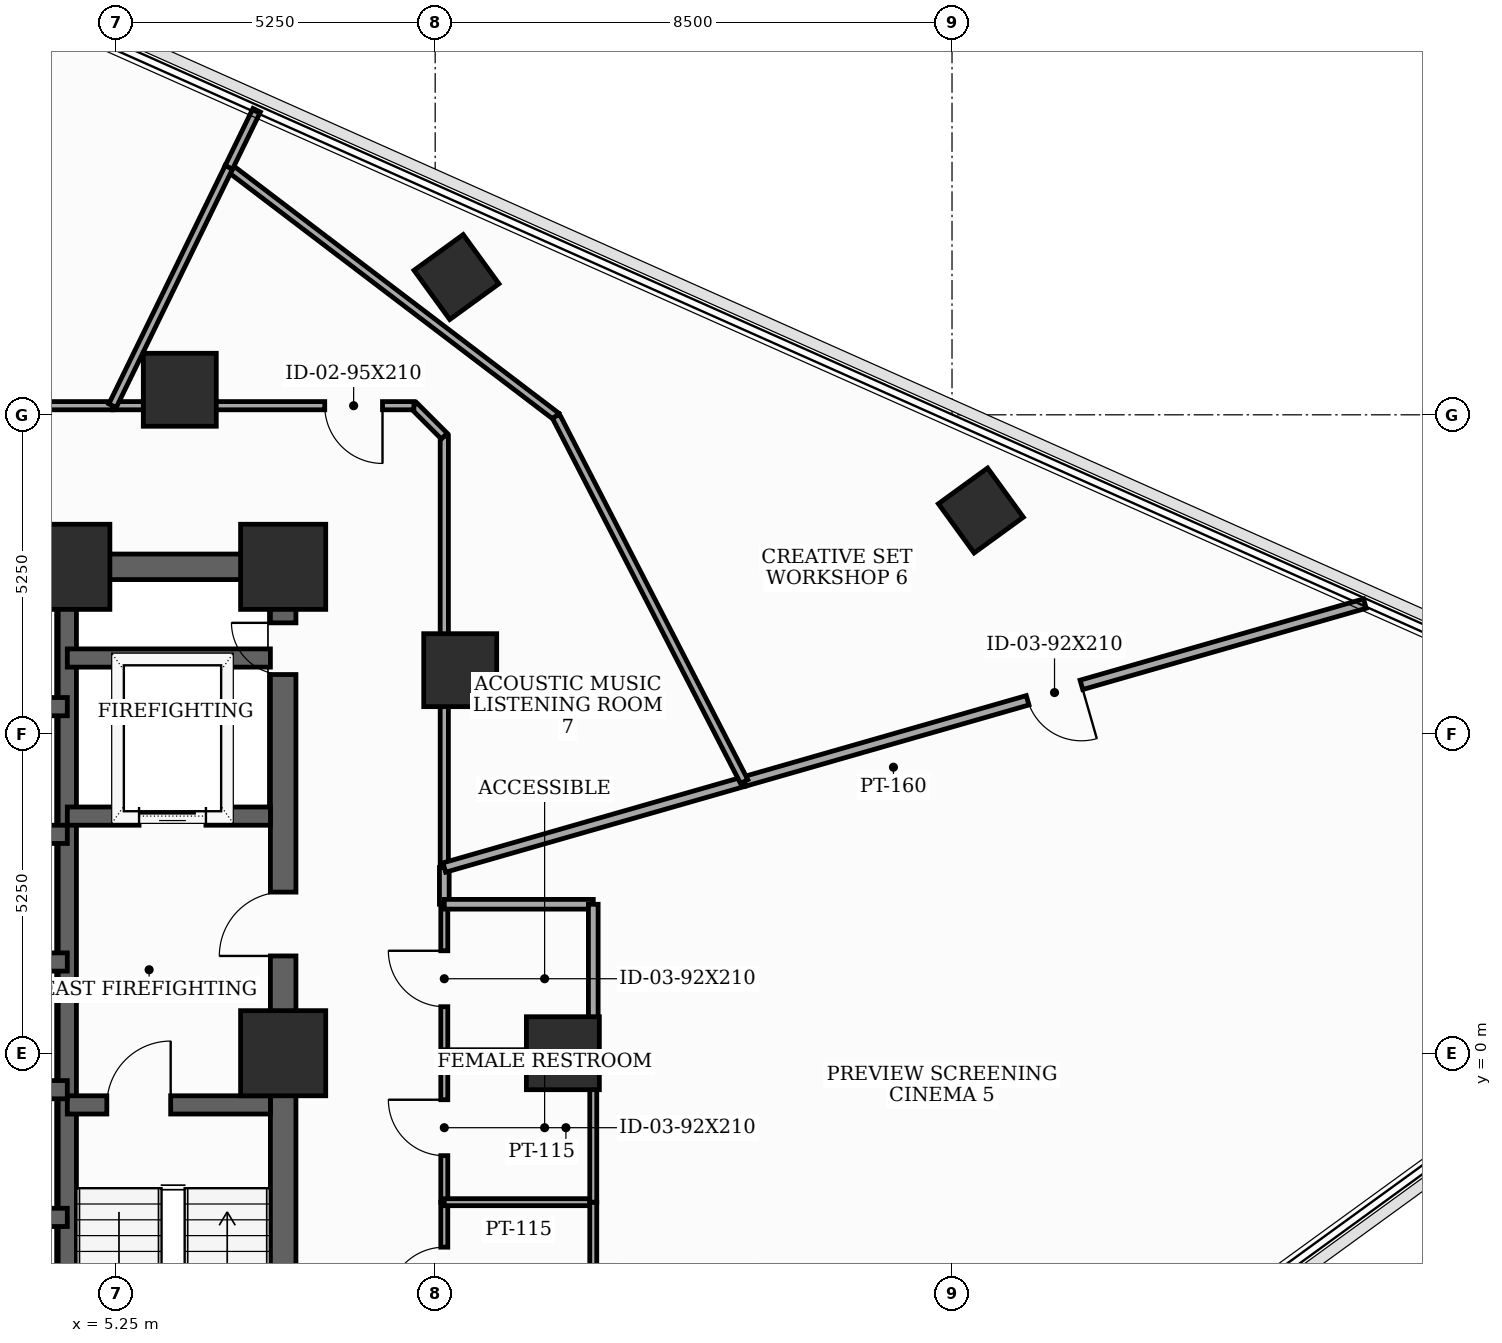
"""IFC4 building model, lengths in metres.
Left out: names, types, materials, properties, quantities, classifications, styles, units other than length and angle.
Written with IfcOpenShell. Run it as: python <this file> out.ifc"""

import sys

from ifc_helpers import new_model, si_unit, direction, frame, frame_2d, origin, origin_2d, place, context, subcontext, project, spatial, rectangle, extrude, element, fill, save


model = new_model("IFC4")
c1 = context("Model", 3, precision=1e-05, world=origin(), true_north=direction((0.0, 1.0)))
c2 = subcontext(c1, "Body", "Model", "MODEL_VIEW")
j1 = project(units=[si_unit("LENGTHUNIT", "METRE"), si_unit("PLANEANGLEUNIT", "RADIAN")], contexts=[c1])
p1 = place(None, origin())
s1 = spatial("IfcSite", under=j1, at=p1, CompositionType="ELEMENT")
p2 = place(p1, origin())
s2 = spatial("IfcBuilding", under=s1, at=p2, CompositionType="ELEMENT")
p3 = place(p2, frame((0.0, 0.0, 158.3)))
s3 = spatial("IfcBuildingStorey", under=s2, at=p3, CompositionType="ELEMENT", Elevation=158.3)
for number, where, z_axis, x_axis in (
    (1, (8.0, 0.0, 0.0), (0.0, 0.0, 1.0), (1.0, 0.0, 0.0)),
    (2, (8.0, 8.0, 0.0), (0.0, 0.0, 1.0), (1.0, 0.0, 0.0)),
    (3, (4.45, 8.0, 0.0), (0.0, 0.0, 1.0), (1.0, 0.0, 0.0)),
):
    element("IfcColumn", number, at=place(p3, frame(where, z_axis=z_axis, x_axis=x_axis)), inside=s3, PredefinedType="COLUMN", context=c2, shape_type="SweptSolid", body=[
        extrude(rectangle(XDim=1.4, YDim=1.4, at=origin_2d()), origin(), (0.0, 0.0, 1.0), 3.7),
    ])
for number, where, z_axis, x_axis in (
    (4, (12.6, 0.0, 0.0), (0.0, 0.0, 1.0), (1.0, 0.0, 0.0)),
    (5, (10.912, 6.3, 0.0), (0.0, 0.0, 1.0), (1.0, 0.0, 0.0)),
    (6, (6.3, 10.912, 0.0), (0.0, 0.0, 1.0), (1.0, 0.0, 0.0)),
):
    element("IfcColumn", number, at=place(p3, frame(where, z_axis=z_axis, x_axis=x_axis)), inside=s3, PredefinedType="COLUMN", context=c2, shape_type="SweptSolid", body=[
        extrude(rectangle(XDim=1.2, YDim=1.2, at=origin_2d()), origin(), (0.0, 0.0, 1.0), 3.7),
    ])
for number, where, z_axis, x_axis in (
    (7, (19.474, 8.926, 0.0), (0.0, 0.0, 1.0), (0.809, 0.588, 0.0)),
    (8, (10.85, 12.766, 0.0), (0.0, 0.0, 1.0), (0.809, 0.588, 0.0)),
):
    element("IfcColumn", number, at=place(p3, frame(where, z_axis=z_axis, x_axis=x_axis)), inside=s3, PredefinedType="COLUMN", context=c2, shape_type="SweptSolid", body=[
        extrude(rectangle(XDim=1.0, YDim=1.0, at=origin_2d()), origin(), (0.0, 0.0, 1.0), 3.7),
    ])
p4 = place(p3, frame((8.0, -8.0, 0.0), z_axis=(0.0, 0.0, 1.0), x_axis=(0.0, 1.0, 0.0)))
e9 = element("IfcWall", 9, at=p4, inside=s3, PredefinedType="SHEAR", context=c2, shape_type="SweptSolid", body=[
    extrude(rectangle(XDim=16.0, YDim=0.42, at=frame_2d((8.0, 0.0))), origin(), (0.0, 0.0, 1.0), 3.5),
])
p5 = place(p4, frame((9.6, 0.0, 0.0)))
e10 = element("IfcOpeningElement", 10, at=p5, cuts=e9, PredefinedType="OPENING", context=c2, shape_type="SweptSolid", body=[
    extrude(rectangle(XDim=1.05, YDim=2.15, at=frame_2d((0.525, 1.075))), frame((0.0, 0.22, 0.0), z_axis=(0.0, -1.0, 0.0), x_axis=(1.0, 0.0, 0.0)), (0.0, 0.0, 1.0), 0.44),
])
p6 = place(p4, frame((14.229, 0.0, 0.0)))
e11 = element("IfcOpeningElement", 11, at=p6, cuts=e9, PredefinedType="OPENING", context=c2, shape_type="SweptSolid", body=[
    extrude(rectangle(XDim=0.85, YDim=2.02, at=frame_2d((0.425, 1.01))), frame((0.0, 0.22, 0.0), z_axis=(0.0, -1.0, 0.0), x_axis=(1.0, 0.0, 0.0)), (0.0, 0.0, 1.0), 0.44),
])
p7 = place(p3, frame((-8.0, 8.0, 0.0), z_axis=(0.0, 0.0, 1.0), x_axis=(1.0, 0.0, 0.0)))
e12 = element("IfcWall", 12, at=p7, inside=s3, PredefinedType="SHEAR", context=c2, shape_type="SweptSolid", body=[
    extrude(rectangle(XDim=16.0, YDim=0.42, at=frame_2d((8.0, 0.0))), origin(), (0.0, 0.0, 1.0), 3.5),
])
p8 = place(p7, frame((7.1, 0.0, 0.0)))
e13 = element("IfcOpeningElement", 13, at=p8, cuts=e12, PredefinedType="OPENING", context=c2, shape_type="SweptSolid", body=[
    extrude(rectangle(XDim=1.8, YDim=2.15, at=frame_2d((0.9, 1.075))), frame((0.0, 0.22, 0.0), z_axis=(0.0, -1.0, 0.0), x_axis=(1.0, 0.0, 0.0)), (0.0, 0.0, 1.0), 0.44),
])
p9 = place(p3, frame((4.45, -7.79, 0.0), z_axis=(0.0, 0.0, 1.0), x_axis=(0.0, 1.0, 0.0)))
e14 = element("IfcWall", 14, at=p9, inside=s3, PredefinedType="SHEAR", context=c2, shape_type="SweptSolid", body=[
    extrude(rectangle(XDim=15.58, YDim=0.3, at=frame_2d((7.79, 0.0))), origin(), (0.0, 0.0, 1.0), 3.5),
])
p10 = place(p3, frame((4.45, -0.85, 0.0), z_axis=(0.0, 0.0, 1.0), x_axis=(1.0, 0.0, 0.0)))
e15 = element("IfcWall", 15, at=p10, inside=s3, PredefinedType="SHEAR", context=c2, shape_type="SweptSolid", body=[
    extrude(rectangle(XDim=3.34, YDim=0.3, at=frame_2d((1.67, 0.0))), origin(), (0.0, 0.0, 1.0), 3.5),
])
p11 = place(p10, frame((0.65, 0.0, 0.0)))
e16 = element("IfcOpeningElement", 16, at=p11, cuts=e15, PredefinedType="OPENING", context=c2, shape_type="SweptSolid", body=[
    extrude(rectangle(XDim=1.05, YDim=2.15, at=frame_2d((0.525, 1.075))), frame((0.0, 0.16, 0.0), z_axis=(0.0, -1.0, 0.0), x_axis=(1.0, 0.0, 0.0)), (0.0, 0.0, 1.0), 0.32),
])
p12 = place(p3, frame((4.45, 3.9, 0.0), z_axis=(0.0, 0.0, 1.0), x_axis=(1.0, 0.0, 0.0)))
e17 = element("IfcWall", 17, at=p12, inside=s3, PredefinedType="SHEAR", context=c2, shape_type="SweptSolid", body=[
    extrude(rectangle(XDim=3.34, YDim=0.3, at=frame_2d((1.67, 0.0))), origin(), (0.0, 0.0, 1.0), 3.5),
])
p13 = place(p12, frame((1.18, 0.0, 0.0)))
e18 = element("IfcOpeningElement", 18, at=p13, cuts=e17, PredefinedType="OPENING", context=c2, shape_type="SweptSolid", body=[
    extrude(rectangle(XDim=1.1, YDim=2.1, at=frame_2d((0.55, 1.05))), frame((0.0, 0.16, 0.0), z_axis=(0.0, -1.0, 0.0), x_axis=(1.0, 0.0, 0.0)), (0.0, 0.0, 1.0), 0.32),
])
p14 = place(p3, frame((4.45, 6.5, 0.0), z_axis=(0.0, 0.0, 1.0), x_axis=(1.0, 0.0, 0.0)))
e19 = element("IfcWall", 19, at=p14, inside=s3, PredefinedType="SHEAR", context=c2, shape_type="SweptSolid", body=[
    extrude(rectangle(XDim=3.34, YDim=0.3, at=frame_2d((1.67, 0.0))), origin(), (0.0, 0.0, 1.0), 3.5),
])
for number, where, z_axis, x_axis in (
    (20, (1.68, 1.5, 0.0), (0.0, 0.0, 1.0), (1.0, 0.0, 0.0)),
    (21, (1.68, 3.6, 0.0), (0.0, 0.0, 1.0), (1.0, 0.0, 0.0)),
    (22, (1.68, 5.7, 0.0), (0.0, 0.0, 1.0), (1.0, 0.0, 0.0)),
    (23, (1.68, -2.7, 0.0), (0.0, 0.0, 1.0), (1.0, 0.0, 0.0)),
    (24, (1.68, -0.6, 0.0), (0.0, 0.0, 1.0), (1.0, 0.0, 0.0)),
):
    element("IfcWall", number, at=place(p3, frame(where, z_axis=z_axis, x_axis=x_axis)), inside=s3, PredefinedType="SHEAR", context=c2, shape_type="SweptSolid", body=[
        extrude(rectangle(XDim=2.77, YDim=0.3, at=frame_2d((1.385, 0.0))), origin(), (0.0, 0.0, 1.0), 3.5),
    ])
p15 = place(p3, frame((10.65, -4.85, 0.0), z_axis=(0.0, 0.0, 1.0), x_axis=(0.0, 1.0, 0.0)))
e25 = element("IfcWall", 25, at=p15, inside=s3, PredefinedType="PARTITIONING", context=c2, shape_type="SweptSolid", body=[
    extrude(rectangle(XDim=2.4, YDim=0.115, at=frame_2d((1.2, 0.0))), origin(), (0.0, 0.0, 1.0), 3.5),
])
p16 = place(p15, frame((0.74, 0.0, 0.0)))
e26 = element("IfcOpeningElement", 26, at=p16, cuts=e25, PredefinedType="OPENING", context=c2, shape_type="SweptSolid", body=[
    extrude(rectangle(XDim=0.92, YDim=2.1, at=frame_2d((0.46, 1.05))), frame((0.0, 0.067, 0.0), z_axis=(0.0, -1.0, 0.0), x_axis=(1.0, 0.0, 0.0)), (0.0, 0.0, 1.0), 0.135),
])
p17 = place(p3, frame((10.65, -2.45, 0.0), z_axis=(0.0, 0.0, 1.0), x_axis=(0.0, 1.0, 0.0)))
e27 = element("IfcWall", 27, at=p17, inside=s3, PredefinedType="PARTITIONING", context=c2, shape_type="SweptSolid", body=[
    extrude(rectangle(XDim=2.45, YDim=0.115, at=frame_2d((1.225, 0.0))), origin(), (0.0, 0.0, 1.0), 2.885),
])
p18 = place(p17, frame((0.765, 0.0, 0.0)))
e28 = element("IfcOpeningElement", 28, at=p18, cuts=e27, PredefinedType="OPENING", context=c2, shape_type="SweptSolid", body=[
    extrude(rectangle(XDim=0.92, YDim=2.1, at=frame_2d((0.46, 1.05))), frame((0.0, 0.067, 0.0), z_axis=(0.0, -1.0, 0.0), x_axis=(1.0, 0.0, 0.0)), (0.0, 0.0, 1.0), 0.135),
])
p19 = place(p3, frame((10.65, 2.45, 0.0), z_axis=(0.0, 0.0, 1.0), x_axis=(0.0, 1.0, 0.0)))
e29 = element("IfcWall", 29, at=p19, inside=s3, PredefinedType="PARTITIONING", context=c2, shape_type="SweptSolid", body=[
    extrude(rectangle(XDim=0.604, YDim=0.16, at=frame_2d((0.302, 0.0))), origin(), (0.0, 0.0, 1.0), 3.5),
])
p20 = place(p3, frame((10.65, 0.0, 0.0), z_axis=(0.0, 0.0, 1.0), x_axis=(0.0, 1.0, 0.0)))
e30 = element("IfcWall", 30, at=p20, inside=s3, PredefinedType="PARTITIONING", context=c2, shape_type="SweptSolid", body=[
    extrude(rectangle(XDim=2.45, YDim=0.115, at=frame_2d((1.225, 0.0))), origin(), (0.0, 0.0, 1.0), 2.885),
])
p21 = place(p20, frame((0.765, 0.0, 0.0)))
e31 = element("IfcOpeningElement", 31, at=p21, cuts=e30, PredefinedType="OPENING", context=c2, shape_type="SweptSolid", body=[
    extrude(rectangle(XDim=0.92, YDim=2.1, at=frame_2d((0.46, 1.05))), frame((0.0, 0.067, 0.0), z_axis=(0.0, -1.0, 0.0), x_axis=(1.0, 0.0, 0.0)), (0.0, 0.0, 1.0), 0.135),
])
p22 = place(p3, frame((10.65, 3.054, 0.0), z_axis=(0.0, 0.0, 1.0), x_axis=(0.0, 1.0, 0.0)))
e32 = element("IfcWall", 32, at=p22, inside=s3, PredefinedType="PARTITIONING", context=c2, shape_type="SweptSolid", body=[
    extrude(rectangle(XDim=7.096, YDim=0.135, at=frame_2d((3.548, 0.0))), origin(), (0.0, 0.0, 1.0), 2.885),
])
p23 = place(p3, frame((10.65, 10.15, 0.0), z_axis=(0.0, 0.0, 1.0), x_axis=(-0.707106781187, 0.707106781187, 0.0)))
e33 = element("IfcWall", 33, at=p23, inside=s3, PredefinedType="PARTITIONING", context=c2, shape_type="SweptSolid", body=[
    extrude(rectangle(XDim=0.707, YDim=0.135, at=frame_2d((0.354, 0.0))), origin(), (0.0, 0.0, 1.0), 3.5),
])
p24 = place(p3, frame((10.15, 10.65, 0.0), z_axis=(0.0, 0.0, 1.0), x_axis=(-1.0, 0.0, 0.0)))
e34 = element("IfcWall", 34, at=p24, inside=s3, PredefinedType="PARTITIONING", context=c2, shape_type="SweptSolid", body=[
    extrude(rectangle(XDim=4.956, YDim=0.135, at=frame_2d((2.478, 0.0))), origin(), (0.0, 0.0, 1.0), 2.885),
])
p25 = place(p24, frame((0.516, 0.0, 0.0)))
e35 = element("IfcOpeningElement", 35, at=p25, cuts=e34, PredefinedType="OPENING", context=c2, shape_type="SweptSolid", body=[
    extrude(rectangle(XDim=0.95, YDim=2.1, at=frame_2d((0.475, 1.05))), frame((0.0, 0.077, 0.0), z_axis=(0.0, -1.0, 0.0), x_axis=(1.0, 0.0, 0.0)), (0.0, 0.0, 1.0), 0.155),
])
p26 = place(p3, frame((5.194, 10.65, 0.0), z_axis=(0.0, 0.0, 1.0), x_axis=(-1.0, 0.0, 0.0)))
e36 = element("IfcWall", 36, at=p26, inside=s3, PredefinedType="PARTITIONING", context=c2, shape_type="SweptSolid", body=[
    extrude(rectangle(XDim=11.343, YDim=0.135, at=frame_2d((5.671, 0.0))), origin(), (0.0, 0.0, 1.0), 2.885),
])
p27 = place(p26, frame((6.558, 0.0, 0.0)))
e37 = element("IfcOpeningElement", 37, at=p27, cuts=e36, PredefinedType="OPENING", context=c2, shape_type="SweptSolid", body=[
    extrude(rectangle(XDim=0.95, YDim=2.1, at=frame_2d((0.475, 1.05))), frame((0.0, 0.077, 0.0), z_axis=(0.0, -1.0, 0.0), x_axis=(1.0, 0.0, 0.0)), (0.0, 0.0, 1.0), 0.155),
])
p28 = place(p3, frame((13.1, -2.45, 0.0), z_axis=(0.0, 0.0, 1.0), x_axis=(-1.0, 0.0, 0.0)))
e38 = element("IfcWall", 38, at=p28, inside=s3, PredefinedType="PARTITIONING", context=c2, shape_type="SweptSolid", body=[
    extrude(rectangle(XDim=2.45, YDim=0.115, at=frame_2d((1.225, 0.0))), origin(), (0.0, 0.0, 1.0), 2.885),
])
p29 = place(p3, frame((13.1, -4.85, 0.0), z_axis=(0.0, 0.0, 1.0), x_axis=(0.0, 1.0, 0.0)))
e39 = element("IfcWall", 39, at=p29, inside=s3, PredefinedType="PARTITIONING", context=c2, shape_type="SweptSolid", body=[
    extrude(rectangle(XDim=2.4, YDim=0.115, at=frame_2d((1.2, 0.0))), origin(), (0.0, 0.0, 1.0), 3.5),
])
p30 = place(p3, frame((13.1, -2.45, 0.0), z_axis=(0.0, 0.0, 1.0), x_axis=(0.0, 1.0, 0.0)))
e40 = element("IfcWall", 40, at=p30, inside=s3, PredefinedType="PARTITIONING", context=c2, shape_type="SweptSolid", body=[
    extrude(rectangle(XDim=2.45, YDim=0.115, at=frame_2d((1.225, 0.0))), origin(), (0.0, 0.0, 1.0), 2.885),
])
p31 = place(p3, frame((13.1, 0.0, 0.0), z_axis=(0.0, 0.0, 1.0), x_axis=(-1.0, 0.0, 0.0)))
e41 = element("IfcWall", 41, at=p31, inside=s3, PredefinedType="PARTITIONING", context=c2, shape_type="SweptSolid", body=[
    extrude(rectangle(XDim=2.45, YDim=0.115, at=frame_2d((1.225, 0.0))), origin(), (0.0, 0.0, 1.0), 2.885),
])
p32 = place(p3, frame((10.65, 2.45, 0.0), z_axis=(0.0, 0.0, 1.0), x_axis=(1.0, 0.0, 0.0)))
e42 = element("IfcWall", 42, at=p32, inside=s3, PredefinedType="PARTITIONING", context=c2, shape_type="SweptSolid", body=[
    extrude(rectangle(XDim=2.45, YDim=0.16, at=frame_2d((1.225, 0.0))), origin(), (0.0, 0.0, 1.0), 2.885),
])
p33 = place(p3, frame((13.1, 2.45, 0.0), z_axis=(0.0, 0.0, 1.0), x_axis=(0.0, -1.0, 0.0)))
e43 = element("IfcWall", 43, at=p33, inside=s3, PredefinedType="PARTITIONING", context=c2, shape_type="SweptSolid", body=[
    extrude(rectangle(XDim=2.45, YDim=0.16, at=frame_2d((1.225, 0.0))), origin(), (0.0, 0.0, 1.0), 3.5),
])
p34 = place(p3, frame((25.79, 7.395, 0.0), z_axis=(0.0, 0.0, 1.0), x_axis=(-0.961256282332, -0.275656234607, 0.0)))
e44 = element("IfcWall", 44, at=p34, inside=s3, PredefinedType="PARTITIONING", context=c2, shape_type="SweptSolid", body=[
    extrude(rectangle(XDim=10.619, YDim=0.16, at=frame_2d((5.31, 0.0))), origin(), (0.0, 0.0, 1.0), 2.985),
])
p35 = place(p34, frame((4.85, 0.0, 0.0)))
e45 = element("IfcOpeningElement", 45, at=p35, cuts=e44, PredefinedType="OPENING", context=c2, shape_type="SweptSolid", body=[
    extrude(rectangle(XDim=0.92, YDim=2.1, at=frame_2d((0.46, 1.05))), frame((0.0, 0.09, 0.0), z_axis=(0.0, -1.0, 0.0), x_axis=(1.0, 0.0, 0.0)), (0.0, 0.0, 1.0), 0.18),
])
p36 = place(p3, frame((15.582, 4.468, 0.0), z_axis=(0.0, 0.0, 1.0), x_axis=(-0.961272163105, -0.275600849852, 0.0)))
e46 = element("IfcWall", 46, at=p36, inside=s3, PredefinedType="PARTITIONING", context=c2, shape_type="SweptSolid", body=[
    extrude(rectangle(XDim=5.131, YDim=0.16, at=frame_2d((2.565, 0.0))), origin(), (0.0, 0.0, 1.0), 2.885),
])
p37 = place(p3, frame((7.106, 14.569, 0.0), z_axis=(0.0, 0.0, 1.0), x_axis=(0.795990968219, -0.60530849863, 0.0)))
e47 = element("IfcWall", 47, at=p37, inside=s3, PredefinedType="PARTITIONING", context=c2, shape_type="SweptSolid", body=[
    extrude(rectangle(XDim=6.76, YDim=0.135, at=frame_2d((3.38, 0.0))), origin(), (0.0, 0.0, 1.0), 2.885),
])
p38 = place(p3, frame((12.487, 10.477, 0.0), z_axis=(0.0, 0.0, 1.0), x_axis=(0.457887389752, -0.889010201464, 0.0)))
e48 = element("IfcWall", 48, at=p38, inside=s3, PredefinedType="PARTITIONING", context=c2, shape_type="SweptSolid", body=[
    extrude(rectangle(XDim=6.759, YDim=0.135, at=frame_2d((3.38, 0.0))), origin(), (0.0, 0.0, 1.0), 2.885),
])
p39 = place(p3, frame((7.564, 15.51, 0.0), z_axis=(0.0, 0.0, 1.0), x_axis=(-0.438230528202, -0.898862616951, 0.0)))
e49 = element("IfcWall", 49, at=p39, inside=s3, PredefinedType="PARTITIONING", context=c2, shape_type="SweptSolid", body=[
    extrude(rectangle(XDim=1.046, YDim=0.135, at=frame_2d((0.523, 0.0))), origin(), (0.0, 0.0, 1.0), 2.985),
])
p40 = place(p3, frame((7.106, 14.569, 0.0), z_axis=(0.0, 0.0, 1.0), x_axis=(-0.43843576568, -0.898762526684, 0.0)))
e50 = element("IfcWall", 50, at=p40, inside=s3, PredefinedType="PARTITIONING", context=c2, shape_type="SweptSolid", body=[
    extrude(rectangle(XDim=4.361, YDim=0.135, at=frame_2d((2.18, 0.0))), origin(), (0.0, 0.0, 1.0), 2.885),
])
p41 = place(p5, origin())
e51 = element("IfcDoor", 51, at=p41, inside=s3, OperationType="SINGLE_SWING_LEFT", PredefinedType="DOOR", context=c2, shape_type="SweptSolid", body=[
    extrude(rectangle(XDim=1.05, YDim=2.15, at=frame_2d((0.525, 1.075))), frame((0.0, 0.025, 0.0), z_axis=(0.0, -1.0, 0.0), x_axis=(1.0, 0.0, 0.0)), (0.0, 0.0, 1.0), 0.05),
])
fill(e10, e51)
p42 = place(p6, origin())
e52 = element("IfcDoor", 52, at=p42, inside=s3, OperationType="SINGLE_SWING_RIGHT", PredefinedType="TRAPDOOR", context=c2, shape_type="SweptSolid", body=[
    extrude(rectangle(XDim=0.85, YDim=2.02, at=frame_2d((0.425, 1.01))), frame((0.0, 0.025, 0.0), z_axis=(0.0, -1.0, 0.0), x_axis=(1.0, 0.0, 0.0)), (0.0, 0.0, 1.0), 0.05),
])
fill(e11, e52)
p43 = place(p11, origin())
e53 = element("IfcDoor", 53, at=p43, inside=s3, OperationType="SINGLE_SWING_RIGHT", PredefinedType="DOOR", context=c2, shape_type="SweptSolid", body=[
    extrude(rectangle(XDim=1.05, YDim=2.15, at=frame_2d((0.525, 1.075))), frame((0.0, 0.025, 0.0), z_axis=(0.0, -1.0, 0.0), x_axis=(1.0, 0.0, 0.0)), (0.0, 0.0, 1.0), 0.05),
])
fill(e16, e53)
p44 = place(p13, origin())
e54 = element("IfcDoor", 54, at=p44, inside=s3, OperationType="SLIDING_TO_LEFT", PredefinedType="DOOR", context=c2, shape_type="SweptSolid", body=[
    extrude(rectangle(XDim=1.1, YDim=2.1, at=frame_2d((0.55, 1.05))), frame((0.0, 0.025, 0.0), z_axis=(0.0, -1.0, 0.0), x_axis=(1.0, 0.0, 0.0)), (0.0, 0.0, 1.0), 0.05),
])
fill(e18, e54)
p45 = place(p16, origin())
e55 = element("IfcDoor", 55, at=p45, inside=s3, OperationType="SINGLE_SWING_LEFT", PredefinedType="DOOR", context=c2, shape_type="SweptSolid", body=[
    extrude(rectangle(XDim=0.92, YDim=2.1, at=frame_2d((0.46, 1.05))), frame((0.0, 0.025, 0.0), z_axis=(0.0, -1.0, 0.0), x_axis=(1.0, 0.0, 0.0)), (0.0, 0.0, 1.0), 0.05),
])
fill(e26, e55)
p46 = place(p18, origin())
e56 = element("IfcDoor", 56, at=p46, inside=s3, OperationType="SINGLE_SWING_RIGHT", PredefinedType="DOOR", context=c2, shape_type="SweptSolid", body=[
    extrude(rectangle(XDim=0.92, YDim=2.1, at=frame_2d((0.46, 1.05))), frame((0.0, 0.025, 0.0), z_axis=(0.0, -1.0, 0.0), x_axis=(1.0, 0.0, 0.0)), (0.0, 0.0, 1.0), 0.05),
])
fill(e28, e56)
p47 = place(p21, origin())
e57 = element("IfcDoor", 57, at=p47, inside=s3, OperationType="SINGLE_SWING_RIGHT", PredefinedType="DOOR", context=c2, shape_type="SweptSolid", body=[
    extrude(rectangle(XDim=0.92, YDim=2.1, at=frame_2d((0.46, 1.05))), frame((0.0, 0.025, 0.0), z_axis=(0.0, -1.0, 0.0), x_axis=(1.0, 0.0, 0.0)), (0.0, 0.0, 1.0), 0.05),
])
fill(e31, e57)
p48 = place(p25, origin())
e58 = element("IfcDoor", 58, at=p48, inside=s3, OperationType="SINGLE_SWING_LEFT", PredefinedType="DOOR", context=c2, shape_type="SweptSolid", body=[
    extrude(rectangle(XDim=0.95, YDim=2.1, at=frame_2d((0.475, 1.05))), frame((0.0, 0.025, 0.0), z_axis=(0.0, -1.0, 0.0), x_axis=(1.0, 0.0, 0.0)), (0.0, 0.0, 1.0), 0.05),
])
fill(e35, e58)
p49 = place(p35, origin())
e59 = element("IfcDoor", 59, at=p49, inside=s3, OperationType="SINGLE_SWING_LEFT", PredefinedType="DOOR", context=c2, shape_type="SweptSolid", body=[
    extrude(rectangle(XDim=0.92, YDim=2.1, at=frame_2d((0.46, 1.05))), frame((0.0, 0.025, 0.0), z_axis=(0.0, -1.0, 0.0), x_axis=(1.0, 0.0, 0.0)), (0.0, 0.0, 1.0), 0.05),
])
fill(e45, e59)
save(model, sys.argv[1])
